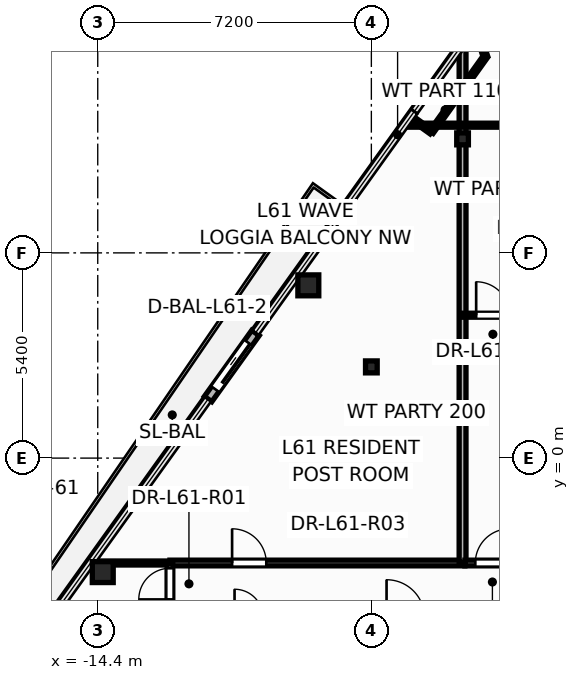
"""IFC4 building model, lengths in metres.
Left out: names, types, materials, properties, quantities, classifications, styles, units other than length and angle.
Written with IfcOpenShell. Run it as: python <this file> out.ifc"""

import sys

from ifc_helpers import new_model, si_unit, direction, frame, frame_2d, origin, origin_2d, place, context, subcontext, project, spatial, rectangle, hollow_circle, i_section, extrude, element, fill, save


model = new_model("IFC4")
c1 = context("Model", 3, precision=1e-05, world=origin(), true_north=direction((0.0, 1.0)))
c2 = subcontext(c1, "Body", "Model", "MODEL_VIEW")
j1 = project(units=[si_unit("LENGTHUNIT", "METRE"), si_unit("PLANEANGLEUNIT", "RADIAN")], contexts=[c1])
p1 = place(None, origin())
s1 = spatial("IfcSite", under=j1, at=p1, CompositionType="ELEMENT")
p2 = place(p1, origin())
s2 = spatial("IfcBuilding", under=s1, at=p2, CompositionType="ELEMENT")
p3 = place(p2, frame((0.0, 0.0, 233.4)))
s3 = spatial("IfcBuildingStorey", under=s2, at=p3, CompositionType="ELEMENT", Elevation=233.4)
for number, where, z_axis, x_axis in (
    (1, (-8.858, 4.546, 0.0), (0.0, 0.0, 1.0), (1.0, 0.0, 0.0)),
    (2, (-14.268, -2.999, 0.0), (0.0, 0.0, 1.0), (1.0, 0.0, 0.0)),
):
    element("IfcColumn", number, at=place(p3, frame(where, z_axis=z_axis, x_axis=x_axis)), inside=s3, PredefinedType="COLUMN", context=c2, shape_type="SweptSolid", body=[
        extrude(hollow_circle(Radius=0.275, WallThickness=0.024, at=origin_2d()), origin(), (0.0, 0.0, 1.0), 3.6),
    ])
for number, where, z_axis, x_axis in (
    (3, (-7.2, 2.4, 0.0), (0.0, 0.0, 1.0), (1.0, 0.0, 0.0)),
    (4, (-4.8, 8.4, 0.0), (0.0, 0.0, 1.0), (1.0, 0.0, 0.0)),
):
    element("IfcColumn", number, at=place(p3, frame(where, z_axis=z_axis, x_axis=x_axis)), inside=s3, PredefinedType="COLUMN", context=c2, shape_type="SweptSolid", body=[
        extrude(i_section(OverallWidth=0.307, OverallDepth=0.314, WebThickness=0.012, FlangeThickness=0.019, at=origin_2d()), origin(), (0.0, 0.0, 1.0), 3.6),
    ])
p4 = place(p3, frame((-10.249, 3.293, -0.015), z_axis=(0.0, 0.0, 1.0), x_axis=(-0.58265081445, -0.812722602381, 0.0)))
e5 = element("IfcWall", 5, at=p4, inside=s3, PredefinedType="STANDARD", context=c2, shape_type="SweptSolid", body=[
    extrude(rectangle(XDim=2.14, YDim=0.24, at=frame_2d((1.07, 0.0))), origin(), (0.0, 0.0, 1.0), 2.878),
])
p5 = place(p4, frame((0.32, 0.0, 0.015)))
e6 = element("IfcOpeningElement", 6, at=p5, cuts=e5, PredefinedType="OPENING", context=c2, shape_type="SweptSolid", body=[
    extrude(rectangle(XDim=1.506, YDim=2.204, at=frame_2d((0.75, 1.102))), frame((0.0, 0.13, 0.0), z_axis=(0.0, -1.0, 0.0), x_axis=(1.0, 0.0, 0.0)), (0.0, 0.0, 1.0), 0.26),
])
p6 = place(p3, frame((-12.5, -2.76, 0.0), z_axis=(0.0, 0.0, 1.0), x_axis=(1.0, 0.0, 0.0)))
e7 = element("IfcWall", 7, at=p6, inside=s3, PredefinedType="PARTITIONING", context=c2, shape_type="SweptSolid", body=[
    extrude(rectangle(XDim=7.76, YDim=0.15, at=frame_2d((3.88, 0.0))), origin(), (0.0, 0.0, 1.0), 2.32),
])
p7 = place(p6, frame((1.635, 0.0, 0.0)))
e8 = element("IfcOpeningElement", 8, at=p7, cuts=e7, PredefinedType="OPENING", context=c2, shape_type="SweptSolid", body=[
    extrude(rectangle(XDim=0.906, YDim=2.104, at=frame_2d((0.45, 1.052))), frame((0.0, 0.085, 0.0), z_axis=(0.0, -1.0, 0.0), x_axis=(1.0, 0.0, 0.0)), (0.0, 0.0, 1.0), 0.17),
])
p8 = place(p3, frame((-4.8, -2.74, 0.0), z_axis=(0.0, 0.0, 1.0), x_axis=(0.0, 1.0, 0.0)))
e9 = element("IfcWall", 9, at=p8, inside=s3, PredefinedType="PARTITIONING", context=c2, shape_type="SweptSolid", body=[
    extrude(rectangle(XDim=13.633, YDim=0.18, at=frame_2d((6.817, 0.0))), origin(), (0.0, 0.0, 1.0), 2.32),
])
p9 = place(p3, frame((-6.329, 8.76, 0.0), z_axis=(0.0, 0.0, 1.0), x_axis=(1.0, 0.0, 0.0)))
e10 = element("IfcWall", 10, at=p9, inside=s3, PredefinedType="PARTITIONING", context=c2, shape_type="SweptSolid", body=[
    extrude(rectangle(XDim=7.129, YDim=0.105, at=frame_2d((3.565, 0.0))), origin(), (0.0, 0.0, 1.0), 2.62),
])
p10 = place(p9, frame((3.49, 0.0, 0.0)))
e11 = element("IfcOpeningElement", 11, at=p10, cuts=e10, PredefinedType="OPENING", context=c2, shape_type="SweptSolid", body=[
    extrude(rectangle(XDim=0.886, YDim=2.104, at=frame_2d((0.44, 1.052))), frame((0.0, 0.062, 0.0), z_axis=(0.0, -1.0, 0.0), x_axis=(1.0, 0.0, 0.0)), (0.0, 0.0, 1.0), 0.125),
])
p11 = place(p3, frame((-4.738, -2.76, 0.0), z_axis=(0.0, 0.0, 1.0), x_axis=(1.0, 0.0, 0.0)))
e12 = element("IfcWall", 12, at=p11, inside=s3, PredefinedType="PARTITIONING", context=c2, shape_type="SweptSolid", body=[
    extrude(rectangle(XDim=3.298, YDim=0.15, at=frame_2d((1.649, 0.0))), origin(), (0.0, 0.0, 1.0), 2.965),
])
p12 = place(p11, frame((0.273, 0.0, 0.0)))
e13 = element("IfcOpeningElement", 13, at=p12, cuts=e12, PredefinedType="OPENING", context=c2, shape_type="SweptSolid", body=[
    extrude(rectangle(XDim=0.906, YDim=2.104, at=frame_2d((0.45, 1.052))), frame((0.0, 0.085, 0.0), z_axis=(0.0, -1.0, 0.0), x_axis=(1.0, 0.0, 0.0)), (0.0, 0.0, 1.0), 0.17),
])
p13 = place(p3, frame((-4.8, 3.76, 0.0), z_axis=(0.0, 0.0, 1.0), x_axis=(1.0, 0.0, 0.0)))
e14 = element("IfcWall", 14, at=p13, inside=s3, PredefinedType="PARTITIONING", context=c2, shape_type="SweptSolid", body=[
    extrude(rectangle(XDim=3.3, YDim=0.105, at=frame_2d((1.65, 0.0))), origin(), (0.0, 0.0, 1.0), 2.965),
])
p14 = place(p13, frame((0.358, 0.0, 0.0)))
e15 = element("IfcOpeningElement", 15, at=p14, cuts=e14, PredefinedType="OPENING", context=c2, shape_type="SweptSolid", body=[
    extrude(rectangle(XDim=0.886, YDim=2.104, at=frame_2d((0.44, 1.052))), frame((0.0, 0.062, 0.0), z_axis=(0.0, -1.0, 0.0), x_axis=(1.0, 0.0, 0.0)), (0.0, 0.0, 1.0), 0.125),
])
p15 = place(p3, frame((-4.199, 10.565, 0.0), z_axis=(0.0, 0.0, 1.0), x_axis=(-0.582627952247, -0.812738992088, 0.0)))
e16 = element("IfcWall", 16, at=p15, inside=s3, PredefinedType="PARTITIONING", context=c2, shape_type="SweptSolid", body=[
    extrude(rectangle(XDim=2.441, YDim=0.12, at=frame_2d((1.221, 0.0))), origin(), (0.0, 0.0, 1.0), 3.345),
])
p16 = place(p3, frame((-14.588, -2.76, 0.0), z_axis=(0.0, 0.0, 1.0), x_axis=(1.0, 0.0, 0.0)))
e17 = element("IfcWall", 17, at=p16, inside=s3, PredefinedType="PARTITIONING", context=c2, shape_type="SweptSolid", body=[
    extrude(rectangle(XDim=2.088, YDim=0.105, at=frame_2d((1.044, 0.0))), origin(), (0.0, 0.0, 1.0), 2.62),
])
p17 = place(p3, frame((-12.5, -4.24, 0.0), z_axis=(0.0, 0.0, 1.0), x_axis=(0.0, 1.0, 0.0)))
e18 = element("IfcWall", 18, at=p17, inside=s3, PredefinedType="PARTITIONING", context=c2, shape_type="SweptSolid", body=[
    extrude(rectangle(XDim=1.48, YDim=0.15, at=frame_2d((0.74, 0.0))), origin(), (0.0, 0.0, 1.0), 2.32),
])
p18 = place(p17, frame((0.522, 0.0, 0.0)))
e19 = element("IfcOpeningElement", 19, at=p18, cuts=e18, PredefinedType="OPENING", context=c2, shape_type="SweptSolid", body=[
    extrude(rectangle(XDim=0.826, YDim=2.104, at=frame_2d((0.41, 1.052))), frame((0.0, 0.085, 0.0), z_axis=(0.0, -1.0, 0.0), x_axis=(1.0, 0.0, 0.0)), (0.0, 0.0, 1.0), 0.17),
])
p19 = place(p3, frame((-4.457, 11.355, 0.0), z_axis=(0.0, 0.0, 1.0), x_axis=(0.310228407268, -0.950662051059, 0.0)))
e20 = element("IfcWall", 20, at=p19, inside=s3, PredefinedType="PARTITIONING", context=c2, shape_type="SweptSolid", body=[
    extrude(rectangle(XDim=0.831, YDim=0.12, at=frame_2d((0.416, 0.0))), origin(), (0.0, 0.0, 1.0), 2.863),
])
p20 = place(p3, frame((-5.621, 8.581, 0.0), z_axis=(0.0, 0.0, 1.0), x_axis=(-0.812797002259, 0.582547022238, 0.0)))
e21 = element("IfcWall", 21, at=p20, inside=s3, PredefinedType="PARTITIONING", context=c2, shape_type="SweptSolid", body=[
    extrude(rectangle(XDim=0.67, YDim=0.12, at=frame_2d((0.335, 0.0))), origin(), (0.0, 0.0, 1.0), 2.863),
])
p21 = place(p5, origin())
e22 = element("IfcDoor", 22, at=p21, inside=s3, OperationType="SLIDING_TO_RIGHT", PredefinedType="DOOR", context=c2, shape_type="SweptSolid", body=[
    extrude(rectangle(XDim=1.5, YDim=2.2, at=frame_2d((0.75, 1.1))), frame((0.0, 0.025, 0.0), z_axis=(0.0, -1.0, 0.0), x_axis=(1.0, 0.0, 0.0)), (0.0, 0.0, 1.0), 0.05),
])
fill(e6, e22)
p22 = place(p18, origin())
e23 = element("IfcDoor", 23, at=p22, inside=s3, OperationType="SINGLE_SWING_LEFT", PredefinedType="DOOR", context=c2, shape_type="SweptSolid", body=[
    extrude(rectangle(XDim=0.82, YDim=2.1, at=frame_2d((0.41, 1.05))), frame((0.0, 0.025, 0.0), z_axis=(0.0, -1.0, 0.0), x_axis=(1.0, 0.0, 0.0)), (0.0, 0.0, 1.0), 0.05),
])
fill(e19, e23)
p23 = place(p7, origin())
e24 = element("IfcDoor", 24, at=p23, inside=s3, OperationType="SINGLE_SWING_LEFT", PredefinedType="DOOR", context=c2, shape_type="SweptSolid", body=[
    extrude(rectangle(XDim=0.9, YDim=2.1, at=frame_2d((0.45, 1.05))), frame((0.0, 0.025, 0.0), z_axis=(0.0, -1.0, 0.0), x_axis=(1.0, 0.0, 0.0)), (0.0, 0.0, 1.0), 0.05),
])
fill(e8, e24)
p24 = place(p12, origin())
e25 = element("IfcDoor", 25, at=p24, inside=s3, OperationType="SINGLE_SWING_RIGHT", PredefinedType="DOOR", context=c2, shape_type="SweptSolid", body=[
    extrude(rectangle(XDim=0.9, YDim=2.1, at=frame_2d((0.45, 1.05))), frame((0.0, 0.025, 0.0), z_axis=(0.0, -1.0, 0.0), x_axis=(1.0, 0.0, 0.0)), (0.0, 0.0, 1.0), 0.05),
])
fill(e13, e25)
p25 = place(p14, origin())
e26 = element("IfcDoor", 26, at=p25, inside=s3, OperationType="SINGLE_SWING_LEFT", PredefinedType="DOOR", context=c2, shape_type="SweptSolid", body=[
    extrude(rectangle(XDim=0.88, YDim=2.1, at=frame_2d((0.44, 1.05))), frame((0.0, 0.025, 0.0), z_axis=(0.0, -1.0, 0.0), x_axis=(1.0, 0.0, 0.0)), (0.0, 0.0, 1.0), 0.05),
])
fill(e15, e26)
save(model, sys.argv[1])
